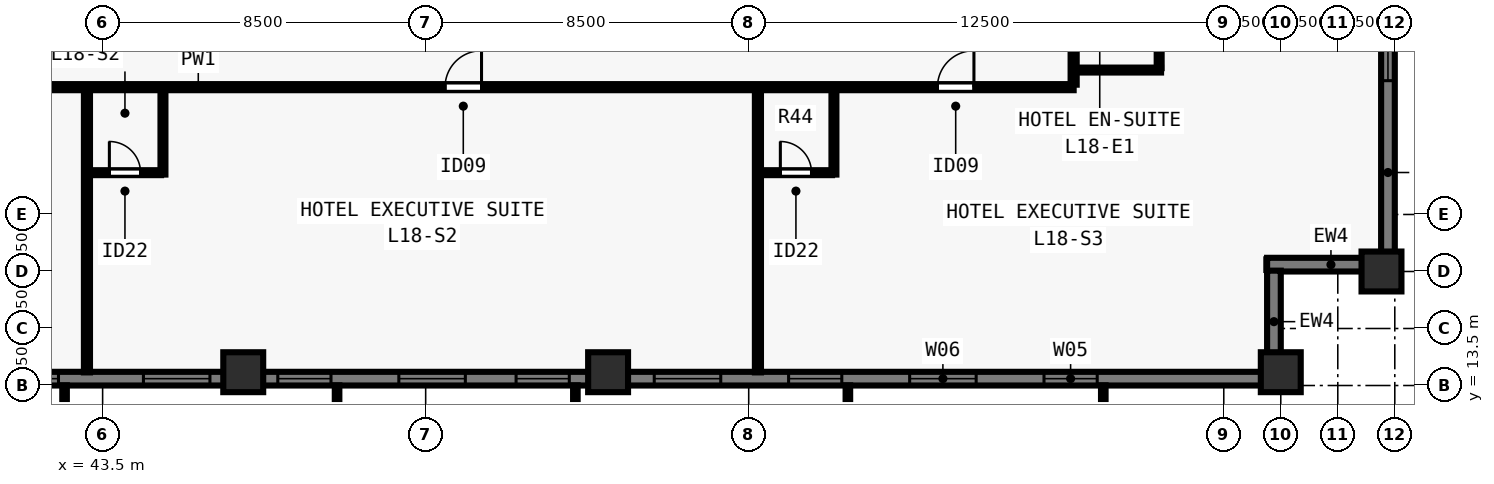
"""IFC4 building model, lengths in metres.
Left out: names, types, materials, properties, quantities, classifications, styles, units other than length and angle.
Written with IfcOpenShell. Run it as: python <this file> out.ifc"""

import sys

from ifc_helpers import new_model, si_unit, direction, frame, frame_2d, origin, origin_2d, place, context, subcontext, project, spatial, rectangle, extrude, element, fill, save


model = new_model("IFC4")
c1 = context("Model", 3, precision=1e-05, world=origin(), true_north=direction((0.0, 1.0)))
c2 = subcontext(c1, "Body", "Model", "MODEL_VIEW")
j1 = project(units=[si_unit("LENGTHUNIT", "METRE"), si_unit("PLANEANGLEUNIT", "RADIAN")], contexts=[c1])
p1 = place(None, origin())
s1 = spatial("IfcSite", under=j1, at=p1, CompositionType="ELEMENT")
p2 = place(p1, origin())
s2 = spatial("IfcBuilding", under=s1, at=p2, CompositionType="ELEMENT")
p3 = place(p2, frame((0.0, 0.0, 69.0)))
s3 = spatial("IfcBuildingStorey", under=s2, at=p3, CompositionType="ELEMENT", Elevation=69.0)
for number, where, z_axis, x_axis in (
    (1, (47.2, 13.85, 0.0), (0.0, 0.0, 1.0), (1.0, 0.0, 0.0)),
    (2, (56.8, 13.85, 0.0), (0.0, 0.0, 1.0), (1.0, 0.0, 0.0)),
    (3, (74.5, 13.85, 0.0), (0.0, 0.0, 1.0), (1.0, 0.0, 0.0)),
    (4, (77.15, 16.5, 0.0), (0.0, 0.0, 1.0), (0.0, 1.0, 0.0)),
):
    element("IfcColumn", number, at=place(p3, frame(where, z_axis=z_axis, x_axis=x_axis)), inside=s3, PredefinedType="COLUMN", context=c2, shape_type="SweptSolid", body=[
        extrude(rectangle(XDim=1.05, YDim=1.05, at=origin_2d()), origin(), (0.0, 0.0, 1.0), 3.5),
    ])
p4 = place(p3, frame((77.32, 35.6, 0.0), z_axis=(0.0, 0.0, 1.0), x_axis=(0.0, -1.0, 0.0)))
e5 = element("IfcWall", 5, at=p4, inside=s3, PredefinedType="SOLIDWALL", context=c2, shape_type="SweptSolid", body=[
    extrude(rectangle(XDim=18.762, YDim=0.36, at=frame_2d((9.381, 0.0))), origin(), (0.0, 0.0, 1.0), 3.28),
])
p5 = place(p4, frame((2.258, 0.0, 0.8)))
e6 = element("IfcOpeningElement", 6, at=p5, cuts=e5, PredefinedType="OPENING", context=c2, shape_type="SweptSolid", body=[
    extrude(rectangle(XDim=1.4, YDim=1.544, at=frame_2d((0.7, 0.772))), frame((0.0, 0.19, 0.0), z_axis=(0.0, -1.0, 0.0), x_axis=(1.0, 0.0, 0.0)), (0.0, 0.0, 1.0), 0.38),
])
p6 = place(p4, frame((5.498, 0.0, 0.8)))
e7 = element("IfcOpeningElement", 7, at=p6, cuts=e5, PredefinedType="OPENING", context=c2, shape_type="SweptSolid", body=[
    extrude(rectangle(XDim=1.75, YDim=1.544, at=frame_2d((0.875, 0.772))), frame((0.0, 0.19, 0.0), z_axis=(0.0, -1.0, 0.0), x_axis=(1.0, 0.0, 0.0)), (0.0, 0.0, 1.0), 0.38),
])
p7 = place(p4, frame((9.089, 0.0, 0.8)))
e8 = element("IfcOpeningElement", 8, at=p7, cuts=e5, PredefinedType="OPENING", context=c2, shape_type="SweptSolid", body=[
    extrude(rectangle(XDim=1.4, YDim=1.544, at=frame_2d((0.7, 0.772))), frame((0.0, 0.19, 0.0), z_axis=(0.0, -1.0, 0.0), x_axis=(1.0, 0.0, 0.0)), (0.0, 0.0, 1.0), 0.38),
])
p8 = place(p4, frame((12.329, 0.0, 0.8)))
e9 = element("IfcOpeningElement", 9, at=p8, cuts=e5, PredefinedType="OPENING", context=c2, shape_type="SweptSolid", body=[
    extrude(rectangle(XDim=1.75, YDim=1.544, at=frame_2d((0.875, 0.772))), frame((0.0, 0.19, 0.0), z_axis=(0.0, -1.0, 0.0), x_axis=(1.0, 0.0, 0.0)), (0.0, 0.0, 1.0), 0.38),
])
p9 = place(p3, frame((77.5, 16.68, 0.0), z_axis=(0.0, 0.0, 1.0), x_axis=(-1.0, 0.0, 0.0)))
e10 = element("IfcWall", 10, at=p9, inside=s3, PredefinedType="SOLIDWALL", context=c2, shape_type="SweptSolid", body=[
    extrude(rectangle(XDim=3.36, YDim=0.36, at=frame_2d((1.68, 0.0))), origin(), (0.0, 0.0, 1.0), 3.28),
])
p10 = place(p3, frame((74.32, 16.522, 0.0), z_axis=(0.0, 0.0, 1.0), x_axis=(0.0, -1.0, 0.0)))
e11 = element("IfcWall", 11, at=p10, inside=s3, PredefinedType="SOLIDWALL", context=c2, shape_type="SweptSolid", body=[
    extrude(rectangle(XDim=2.684, YDim=0.36, at=frame_2d((1.342, 0.0))), origin(), (0.0, 0.0, 1.0), 3.28),
])
p11 = place(p3, frame((74.5, 13.68, 0.0), z_axis=(0.0, 0.0, 1.0), x_axis=(-1.0, 0.0, 0.0)))
e12 = element("IfcWall", 12, at=p11, inside=s3, PredefinedType="SOLIDWALL", context=c2, shape_type="SweptSolid", body=[
    extrude(rectangle(XDim=44.662, YDim=0.36, at=frame_2d((22.331, 0.0))), origin(), (0.0, 0.0, 1.0), 3.28),
])
p12 = place(p11, frame((4.83, 0.0, 0.8)))
e13 = element("IfcOpeningElement", 13, at=p12, cuts=e12, PredefinedType="OPENING", context=c2, shape_type="SweptSolid", body=[
    extrude(rectangle(XDim=1.4, YDim=1.544, at=frame_2d((0.7, 0.772))), frame((0.0, 0.19, 0.0), z_axis=(0.0, -1.0, 0.0), x_axis=(1.0, 0.0, 0.0)), (0.0, 0.0, 1.0), 0.38),
])
p13 = place(p11, frame((8.015, 0.0, 0.8)))
e14 = element("IfcOpeningElement", 14, at=p13, cuts=e12, PredefinedType="OPENING", context=c2, shape_type="SweptSolid", body=[
    extrude(rectangle(XDim=1.75, YDim=1.544, at=frame_2d((0.875, 0.772))), frame((0.0, 0.19, 0.0), z_axis=(0.0, -1.0, 0.0), x_axis=(1.0, 0.0, 0.0)), (0.0, 0.0, 1.0), 0.38),
])
p14 = place(p11, frame((11.551, 0.0, 0.8)))
e15 = element("IfcOpeningElement", 15, at=p14, cuts=e12, PredefinedType="OPENING", context=c2, shape_type="SweptSolid", body=[
    extrude(rectangle(XDim=1.4, YDim=1.544, at=frame_2d((0.7, 0.772))), frame((0.0, 0.19, 0.0), z_axis=(0.0, -1.0, 0.0), x_axis=(1.0, 0.0, 0.0)), (0.0, 0.0, 1.0), 0.38),
])
p15 = place(p11, frame((14.736, 0.0, 0.8)))
e16 = element("IfcOpeningElement", 16, at=p15, cuts=e12, PredefinedType="OPENING", context=c2, shape_type="SweptSolid", body=[
    extrude(rectangle(XDim=1.75, YDim=1.544, at=frame_2d((0.875, 0.772))), frame((0.0, 0.19, 0.0), z_axis=(0.0, -1.0, 0.0), x_axis=(1.0, 0.0, 0.0)), (0.0, 0.0, 1.0), 0.38),
])
p16 = place(p11, frame((18.721, 0.0, 0.8)))
e17 = element("IfcOpeningElement", 17, at=p16, cuts=e12, PredefinedType="OPENING", context=c2, shape_type="SweptSolid", body=[
    extrude(rectangle(XDim=1.4, YDim=1.544, at=frame_2d((0.7, 0.772))), frame((0.0, 0.19, 0.0), z_axis=(0.0, -1.0, 0.0), x_axis=(1.0, 0.0, 0.0)), (0.0, 0.0, 1.0), 0.38),
])
p17 = place(p11, frame((21.456, 0.0, 0.8)))
e18 = element("IfcOpeningElement", 18, at=p17, cuts=e12, PredefinedType="OPENING", context=c2, shape_type="SweptSolid", body=[
    extrude(rectangle(XDim=1.75, YDim=1.544, at=frame_2d((0.875, 0.772))), frame((0.0, 0.19, 0.0), z_axis=(0.0, -1.0, 0.0), x_axis=(1.0, 0.0, 0.0)), (0.0, 0.0, 1.0), 0.38),
])
p18 = place(p11, frame((24.991, 0.0, 0.8)))
e19 = element("IfcOpeningElement", 19, at=p18, cuts=e12, PredefinedType="OPENING", context=c2, shape_type="SweptSolid", body=[
    extrude(rectangle(XDim=1.4, YDim=1.544, at=frame_2d((0.7, 0.772))), frame((0.0, 0.19, 0.0), z_axis=(0.0, -1.0, 0.0), x_axis=(1.0, 0.0, 0.0)), (0.0, 0.0, 1.0), 0.38),
])
p19 = place(p11, frame((28.177, 0.0, 0.8)))
e20 = element("IfcOpeningElement", 20, at=p19, cuts=e12, PredefinedType="OPENING", context=c2, shape_type="SweptSolid", body=[
    extrude(rectangle(XDim=1.75, YDim=1.544, at=frame_2d((0.875, 0.772))), frame((0.0, 0.19, 0.0), z_axis=(0.0, -1.0, 0.0), x_axis=(1.0, 0.0, 0.0)), (0.0, 0.0, 1.0), 0.38),
])
p20 = place(p11, frame((32.162, 0.0, 0.8)))
e21 = element("IfcOpeningElement", 21, at=p20, cuts=e12, PredefinedType="OPENING", context=c2, shape_type="SweptSolid", body=[
    extrude(rectangle(XDim=1.4, YDim=1.544, at=frame_2d((0.7, 0.772))), frame((0.0, 0.19, 0.0), z_axis=(0.0, -1.0, 0.0), x_axis=(1.0, 0.0, 0.0)), (0.0, 0.0, 1.0), 0.38),
])
p21 = place(p11, frame((34.897, 0.0, 0.8)))
e22 = element("IfcOpeningElement", 22, at=p21, cuts=e12, PredefinedType="OPENING", context=c2, shape_type="SweptSolid", body=[
    extrude(rectangle(XDim=1.75, YDim=1.544, at=frame_2d((0.875, 0.772))), frame((0.0, 0.19, 0.0), z_axis=(0.0, -1.0, 0.0), x_axis=(1.0, 0.0, 0.0)), (0.0, 0.0, 1.0), 0.38),
])
p22 = place(p11, frame((38.432, 0.0, 0.8)))
e23 = element("IfcOpeningElement", 23, at=p22, cuts=e12, PredefinedType="OPENING", context=c2, shape_type="SweptSolid", body=[
    extrude(rectangle(XDim=1.4, YDim=1.544, at=frame_2d((0.7, 0.772))), frame((0.0, 0.19, 0.0), z_axis=(0.0, -1.0, 0.0), x_axis=(1.0, 0.0, 0.0)), (0.0, 0.0, 1.0), 0.38),
])
p23 = place(p3, frame((34.95, 21.35, 0.0), z_axis=(0.0, 0.0, 1.0), x_axis=(1.0, 0.0, 0.0)))
e24 = element("IfcWall", 24, at=p23, inside=s3, PredefinedType="PARTITIONING", context=c2, shape_type="SweptSolid", body=[
    extrude(rectangle(XDim=34.1, YDim=0.16, at=frame_2d((17.05, 0.0))), origin(), (0.0, 0.0, 1.0), 3.28),
])
p24 = place(p23, frame((3.614, 0.0, 0.0)))
e25 = element("IfcOpeningElement", 25, at=p24, cuts=e24, PredefinedType="OPENING", context=c2, shape_type="SweptSolid", body=[
    extrude(rectangle(XDim=0.96, YDim=2.15, at=frame_2d((0.48, 1.075))), frame((0.0, 0.09, 0.0), z_axis=(0.0, -1.0, 0.0), x_axis=(1.0, 0.0, 0.0)), (0.0, 0.0, 1.0), 0.18),
])
p25 = place(p23, frame((17.56, 0.0, 0.0)))
e26 = element("IfcOpeningElement", 26, at=p25, cuts=e24, PredefinedType="OPENING", context=c2, shape_type="SweptSolid", body=[
    extrude(rectangle(XDim=0.96, YDim=2.15, at=frame_2d((0.48, 1.075))), frame((0.0, 0.09, 0.0), z_axis=(0.0, -1.0, 0.0), x_axis=(1.0, 0.0, 0.0)), (0.0, 0.0, 1.0), 0.18),
])
p26 = place(p23, frame((30.516, 0.0, 0.0)))
e27 = element("IfcOpeningElement", 27, at=p26, cuts=e24, PredefinedType="OPENING", context=c2, shape_type="SweptSolid", body=[
    extrude(rectangle(XDim=0.96, YDim=2.15, at=frame_2d((0.48, 1.075))), frame((0.0, 0.09, 0.0), z_axis=(0.0, -1.0, 0.0), x_axis=(1.0, 0.0, 0.0)), (0.0, 0.0, 1.0), 0.18),
])
p27 = place(p3, frame((69.05, 21.415, 0.0), z_axis=(0.0, 0.0, 1.0), x_axis=(0.0, 1.0, 0.0)))
e28 = element("IfcWall", 28, at=p27, inside=s3, PredefinedType="PARTITIONING", context=c2, shape_type="SweptSolid", body=[
    extrude(rectangle(XDim=35.17, YDim=0.16, at=frame_2d((17.585, 0.0))), origin(), (0.0, 0.0, 1.0), 3.28),
])
p28 = place(p27, frame((9.746, 0.0, 0.0)))
e29 = element("IfcOpeningElement", 29, at=p28, cuts=e28, PredefinedType="OPENING", context=c2, shape_type="SweptSolid", body=[
    extrude(rectangle(XDim=0.96, YDim=2.15, at=frame_2d((0.48, 1.075))), frame((0.0, 0.09, 0.0), z_axis=(0.0, -1.0, 0.0), x_axis=(1.0, 0.0, 0.0)), (0.0, 0.0, 1.0), 0.18),
])
p29 = place(p27, frame((27.146, 0.0, 0.0)))
e30 = element("IfcOpeningElement", 30, at=p29, cuts=e28, PredefinedType="OPENING", context=c2, shape_type="SweptSolid", body=[
    extrude(rectangle(XDim=0.96, YDim=2.15, at=frame_2d((0.48, 1.075))), frame((0.0, 0.09, 0.0), z_axis=(0.0, -1.0, 0.0), x_axis=(1.0, 0.0, 0.0)), (0.0, 0.0, 1.0), 0.18),
])
p30 = place(p3, frame((43.087, 13.845, 0.0), z_axis=(0.0, 0.0, 1.0), x_axis=(0.0, 1.0, 0.0)))
e31 = element("IfcWall", 31, at=p30, inside=s3, PredefinedType="PARTITIONING", context=c2, shape_type="SweptSolid", body=[
    extrude(rectangle(XDim=7.44, YDim=0.16, at=frame_2d((3.72, 0.0))), origin(), (0.0, 0.0, 1.0), 3.28),
])
p31 = place(p3, frame((45.087, 19.05, 0.0), z_axis=(0.0, 0.0, 1.0), x_axis=(0.0, 1.0, 0.0)))
e32 = element("IfcWall", 32, at=p31, inside=s3, PredefinedType="PLUMBINGWALL", context=c2, shape_type="SweptSolid", body=[
    extrude(rectangle(XDim=2.235, YDim=0.13, at=frame_2d((1.117, 0.0))), origin(), (0.0, 0.0, 1.0), 3.28),
])
p32 = place(p3, frame((43.153, 19.1, 0.0), z_axis=(0.0, 0.0, 1.0), x_axis=(1.0, 0.0, 0.0)))
e33 = element("IfcWall", 33, at=p32, inside=s3, PredefinedType="PLUMBINGWALL", context=c2, shape_type="SweptSolid", body=[
    extrude(rectangle(XDim=1.885, YDim=0.13, at=frame_2d((0.942, 0.0))), origin(), (0.0, 0.0, 1.0), 3.28),
])
p33 = place(p32, frame((0.525, 0.0, 0.0)))
e34 = element("IfcOpeningElement", 34, at=p33, cuts=e33, PredefinedType="OPENING", context=c2, shape_type="SweptSolid", body=[
    extrude(rectangle(XDim=0.82, YDim=2.1, at=frame_2d((0.41, 1.05))), frame((0.0, 0.075, 0.0), z_axis=(0.0, -1.0, 0.0), x_axis=(1.0, 0.0, 0.0)), (0.0, 0.0, 1.0), 0.15),
])
p34 = place(p3, frame((60.742, 13.845, 0.0), z_axis=(0.0, 0.0, 1.0), x_axis=(0.0, 1.0, 0.0)))
e35 = element("IfcWall", 35, at=p34, inside=s3, PredefinedType="PARTITIONING", context=c2, shape_type="SweptSolid", body=[
    extrude(rectangle(XDim=7.44, YDim=0.16, at=frame_2d((3.72, 0.0))), origin(), (0.0, 0.0, 1.0), 3.28),
])
p35 = place(p3, frame((62.742, 19.05, 0.0), z_axis=(0.0, 0.0, 1.0), x_axis=(0.0, 1.0, 0.0)))
e36 = element("IfcWall", 36, at=p35, inside=s3, PredefinedType="PLUMBINGWALL", context=c2, shape_type="SweptSolid", body=[
    extrude(rectangle(XDim=2.235, YDim=0.13, at=frame_2d((1.117, 0.0))), origin(), (0.0, 0.0, 1.0), 3.28),
])
p36 = place(p3, frame((60.808, 19.1, 0.0), z_axis=(0.0, 0.0, 1.0), x_axis=(1.0, 0.0, 0.0)))
e37 = element("IfcWall", 37, at=p36, inside=s3, PredefinedType="PLUMBINGWALL", context=c2, shape_type="SweptSolid", body=[
    extrude(rectangle(XDim=1.885, YDim=0.13, at=frame_2d((0.942, 0.0))), origin(), (0.0, 0.0, 1.0), 3.28),
])
p37 = place(p36, frame((0.525, 0.0, 0.0)))
e38 = element("IfcOpeningElement", 38, at=p37, cuts=e37, PredefinedType="OPENING", context=c2, shape_type="SweptSolid", body=[
    extrude(rectangle(XDim=0.82, YDim=2.1, at=frame_2d((0.41, 1.05))), frame((0.0, 0.075, 0.0), z_axis=(0.0, -1.0, 0.0), x_axis=(1.0, 0.0, 0.0)), (0.0, 0.0, 1.0), 0.15),
])
p38 = place(p3, frame((69.115, 21.8, 0.0), z_axis=(0.0, 0.0, 1.0), x_axis=(1.0, 0.0, 0.0)))
e39 = element("IfcWall", 39, at=p38, inside=s3, PredefinedType="PLUMBINGWALL", context=c2, shape_type="SweptSolid", body=[
    extrude(rectangle(XDim=2.235, YDim=0.13, at=frame_2d((1.118, 0.0))), origin(), (0.0, 0.0, 1.0), 2.849),
])
p39 = place(p3, frame((71.3, 21.85, 0.0), z_axis=(0.0, 0.0, 1.0), x_axis=(0.0, 1.0, 0.0)))
e40 = element("IfcWall", 40, at=p39, inside=s3, PredefinedType="PLUMBINGWALL", context=c2, shape_type="SweptSolid", body=[
    extrude(rectangle(XDim=1.9, YDim=0.13, at=frame_2d((0.95, 0.0))), origin(), (0.0, 0.0, 1.0), 3.28),
])
p40 = place(p39, frame((0.54, 0.0, 0.0)))
e41 = element("IfcOpeningElement", 41, at=p40, cuts=e40, PredefinedType="OPENING", context=c2, shape_type="SweptSolid", body=[
    extrude(rectangle(XDim=0.82, YDim=2.1, at=frame_2d((0.41, 1.05))), frame((0.0, 0.075, 0.0), z_axis=(0.0, -1.0, 0.0), x_axis=(1.0, 0.0, 0.0)), (0.0, 0.0, 1.0), 0.15),
])
p41 = place(p8, origin())
e42 = element("IfcWindow", 42, at=p41, inside=s3, PartitioningType="SINGLE_PANEL", PredefinedType="WINDOW", context=c2, shape_type="SweptSolid", body=[
    extrude(rectangle(XDim=1.75, YDim=1.544, at=frame_2d((0.875, 0.772))), frame((0.0, -0.05, 0.0), z_axis=(0.0, -1.0, 0.0), x_axis=(1.0, 0.0, 0.0)), (0.0, 0.0, 1.0), 0.06),
])
fill(e9, e42)
p42 = place(p12, origin())
e43 = element("IfcWindow", 43, at=p42, inside=s3, PartitioningType="SINGLE_PANEL", PredefinedType="WINDOW", context=c2, shape_type="SweptSolid", body=[
    extrude(rectangle(XDim=1.4, YDim=1.544, at=frame_2d((0.7, 0.772))), frame((0.0, -0.05, 0.0), z_axis=(0.0, -1.0, 0.0), x_axis=(1.0, 0.0, 0.0)), (0.0, 0.0, 1.0), 0.06),
])
fill(e13, e43)
p43 = place(p13, origin())
e44 = element("IfcWindow", 44, at=p43, inside=s3, PartitioningType="SINGLE_PANEL", PredefinedType="WINDOW", context=c2, shape_type="SweptSolid", body=[
    extrude(rectangle(XDim=1.75, YDim=1.544, at=frame_2d((0.875, 0.772))), frame((0.0, -0.05, 0.0), z_axis=(0.0, -1.0, 0.0), x_axis=(1.0, 0.0, 0.0)), (0.0, 0.0, 1.0), 0.06),
])
fill(e14, e44)
p44 = place(p14, origin())
e45 = element("IfcWindow", 45, at=p44, inside=s3, PartitioningType="SINGLE_PANEL", PredefinedType="WINDOW", context=c2, shape_type="SweptSolid", body=[
    extrude(rectangle(XDim=1.4, YDim=1.544, at=frame_2d((0.7, 0.772))), frame((0.0, -0.05, 0.0), z_axis=(0.0, -1.0, 0.0), x_axis=(1.0, 0.0, 0.0)), (0.0, 0.0, 1.0), 0.06),
])
fill(e15, e45)
p45 = place(p15, origin())
e46 = element("IfcWindow", 46, at=p45, inside=s3, PartitioningType="SINGLE_PANEL", PredefinedType="WINDOW", context=c2, shape_type="SweptSolid", body=[
    extrude(rectangle(XDim=1.75, YDim=1.544, at=frame_2d((0.875, 0.772))), frame((0.0, -0.05, 0.0), z_axis=(0.0, -1.0, 0.0), x_axis=(1.0, 0.0, 0.0)), (0.0, 0.0, 1.0), 0.06),
])
fill(e16, e46)
p46 = place(p16, origin())
e47 = element("IfcWindow", 47, at=p46, inside=s3, PartitioningType="SINGLE_PANEL", PredefinedType="WINDOW", context=c2, shape_type="SweptSolid", body=[
    extrude(rectangle(XDim=1.4, YDim=1.544, at=frame_2d((0.7, 0.772))), frame((0.0, -0.05, 0.0), z_axis=(0.0, -1.0, 0.0), x_axis=(1.0, 0.0, 0.0)), (0.0, 0.0, 1.0), 0.06),
])
fill(e17, e47)
p47 = place(p17, origin())
e48 = element("IfcWindow", 48, at=p47, inside=s3, PartitioningType="SINGLE_PANEL", PredefinedType="WINDOW", context=c2, shape_type="SweptSolid", body=[
    extrude(rectangle(XDim=1.75, YDim=1.544, at=frame_2d((0.875, 0.772))), frame((0.0, -0.05, 0.0), z_axis=(0.0, -1.0, 0.0), x_axis=(1.0, 0.0, 0.0)), (0.0, 0.0, 1.0), 0.06),
])
fill(e18, e48)
p48 = place(p18, origin())
e49 = element("IfcWindow", 49, at=p48, inside=s3, PartitioningType="SINGLE_PANEL", PredefinedType="WINDOW", context=c2, shape_type="SweptSolid", body=[
    extrude(rectangle(XDim=1.4, YDim=1.544, at=frame_2d((0.7, 0.772))), frame((0.0, -0.05, 0.0), z_axis=(0.0, -1.0, 0.0), x_axis=(1.0, 0.0, 0.0)), (0.0, 0.0, 1.0), 0.06),
])
fill(e19, e49)
p49 = place(p19, origin())
e50 = element("IfcWindow", 50, at=p49, inside=s3, PartitioningType="SINGLE_PANEL", PredefinedType="WINDOW", context=c2, shape_type="SweptSolid", body=[
    extrude(rectangle(XDim=1.75, YDim=1.544, at=frame_2d((0.875, 0.772))), frame((0.0, -0.05, 0.0), z_axis=(0.0, -1.0, 0.0), x_axis=(1.0, 0.0, 0.0)), (0.0, 0.0, 1.0), 0.06),
])
fill(e20, e50)
p50 = place(p20, origin())
e51 = element("IfcWindow", 51, at=p50, inside=s3, PartitioningType="SINGLE_PANEL", PredefinedType="WINDOW", context=c2, shape_type="SweptSolid", body=[
    extrude(rectangle(XDim=1.4, YDim=1.544, at=frame_2d((0.7, 0.772))), frame((0.0, -0.05, 0.0), z_axis=(0.0, -1.0, 0.0), x_axis=(1.0, 0.0, 0.0)), (0.0, 0.0, 1.0), 0.06),
])
fill(e21, e51)
p51 = place(p33, origin())
e52 = element("IfcDoor", 52, at=p51, inside=s3, OperationType="SINGLE_SWING_LEFT", PredefinedType="DOOR", context=c2, shape_type="SweptSolid", body=[
    extrude(rectangle(XDim=0.82, YDim=2.1, at=frame_2d((0.41, 1.05))), frame((0.0, 0.025, 0.0), z_axis=(0.0, -1.0, 0.0), x_axis=(1.0, 0.0, 0.0)), (0.0, 0.0, 1.0), 0.05),
])
fill(e34, e52)
p52 = place(p25, origin())
e53 = element("IfcDoor", 53, at=p52, inside=s3, OperationType="SINGLE_SWING_RIGHT", PredefinedType="DOOR", context=c2, shape_type="SweptSolid", body=[
    extrude(rectangle(XDim=0.96, YDim=2.15, at=frame_2d((0.48, 1.075))), frame((0.0, 0.025, 0.0), z_axis=(0.0, -1.0, 0.0), x_axis=(1.0, 0.0, 0.0)), (0.0, 0.0, 1.0), 0.05),
])
fill(e26, e53)
p53 = place(p37, origin())
e54 = element("IfcDoor", 54, at=p53, inside=s3, OperationType="SINGLE_SWING_LEFT", PredefinedType="DOOR", context=c2, shape_type="SweptSolid", body=[
    extrude(rectangle(XDim=0.82, YDim=2.1, at=frame_2d((0.41, 1.05))), frame((0.0, 0.025, 0.0), z_axis=(0.0, -1.0, 0.0), x_axis=(1.0, 0.0, 0.0)), (0.0, 0.0, 1.0), 0.05),
])
fill(e38, e54)
p54 = place(p26, origin())
e55 = element("IfcDoor", 55, at=p54, inside=s3, OperationType="SINGLE_SWING_RIGHT", PredefinedType="DOOR", context=c2, shape_type="SweptSolid", body=[
    extrude(rectangle(XDim=0.96, YDim=2.15, at=frame_2d((0.48, 1.075))), frame((0.0, 0.025, 0.0), z_axis=(0.0, -1.0, 0.0), x_axis=(1.0, 0.0, 0.0)), (0.0, 0.0, 1.0), 0.05),
])
fill(e27, e55)
save(model, sys.argv[1])
